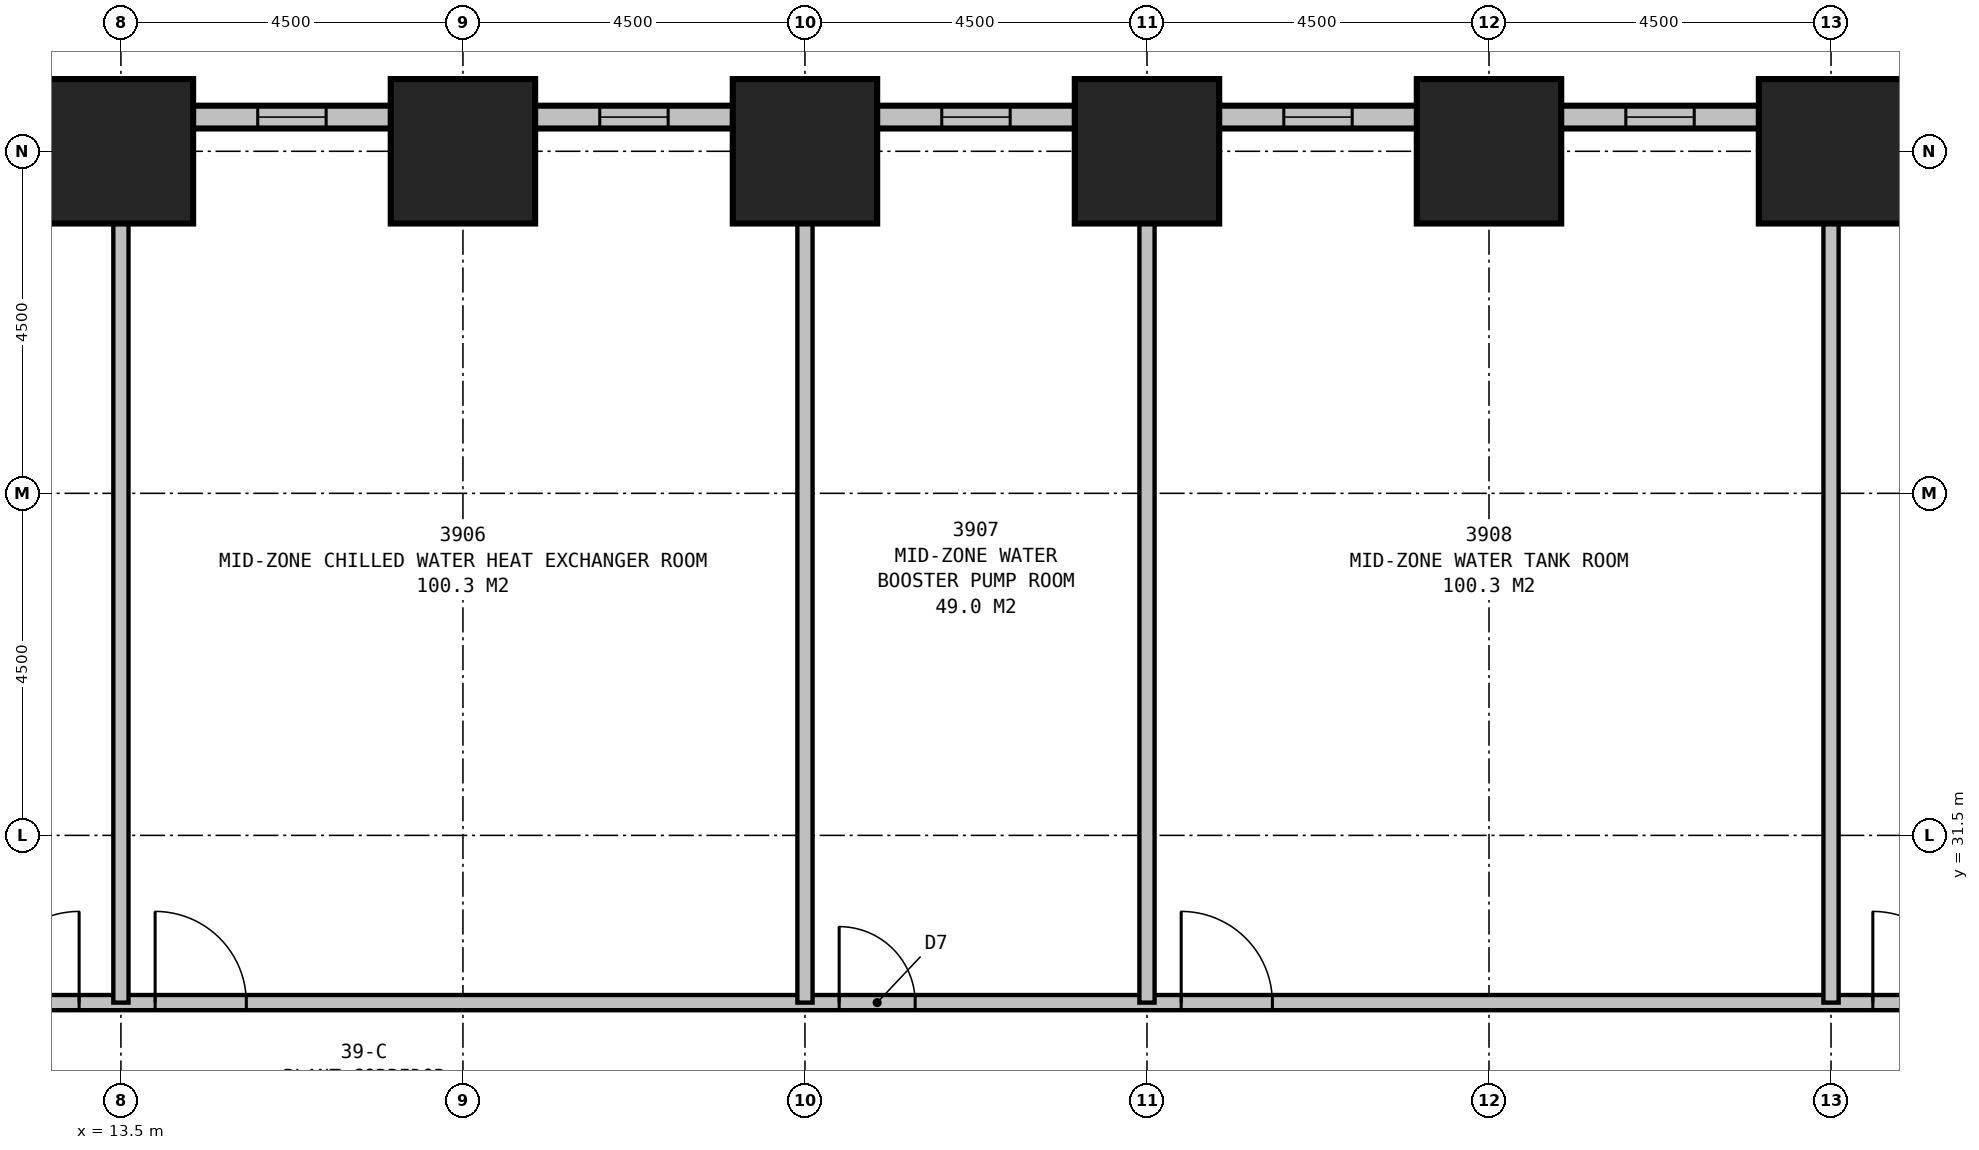
"""IFC4 building model, lengths in metres.
Left out: names, types, materials, properties, quantities, classifications, styles, units other than length and angle.
Written with IfcOpenShell. Run it as: python <this file> out.ifc"""

import sys

from ifc_helpers import new_model, si_unit, direction, frame, frame_2d, origin, origin_2d, place, context, subcontext, project, spatial, rectangle, extrude, element, fill, save


model = new_model("IFC4")
c1 = context("Model", 3, precision=1e-05, world=origin(), true_north=direction((0.0, 1.0)))
c2 = subcontext(c1, "Body", "Model", "MODEL_VIEW")
j1 = project(units=[si_unit("LENGTHUNIT", "METRE"), si_unit("PLANEANGLEUNIT", "RADIAN")], contexts=[c1])
p1 = place(None, origin())
s1 = spatial("IfcSite", under=j1, at=p1, CompositionType="ELEMENT")
p2 = place(p1, origin())
s2 = spatial("IfcBuilding", under=s1, at=p2, CompositionType="ELEMENT")
p3 = place(p2, frame((0.0, 0.0, 151.9)))
s3 = spatial("IfcBuildingStorey", under=s2, at=p3, CompositionType="ELEMENT", Elevation=151.9)
for number, where, z_axis, x_axis in (
    (1, (36.0, 40.5, 0.0), (0.0, 0.0, 1.0), (1.0, 0.0, 0.0)),
    (2, (31.5, 40.5, 0.0), (0.0, 0.0, 1.0), (1.0, 0.0, 0.0)),
    (3, (27.0, 40.5, 0.0), (0.0, 0.0, 1.0), (1.0, 0.0, 0.0)),
    (4, (22.5, 40.5, 0.0), (0.0, 0.0, 1.0), (1.0, 0.0, 0.0)),
    (5, (18.0, 40.5, 0.0), (0.0, 0.0, 1.0), (1.0, 0.0, 0.0)),
    (6, (13.5, 40.5, 0.0), (0.0, 0.0, 1.0), (1.0, 0.0, 0.0)),
):
    element("IfcColumn", number, at=place(p3, frame(where, z_axis=z_axis, x_axis=x_axis)), inside=s3, PredefinedType="COLUMN", context=c2, shape_type="SweptSolid", body=[
        extrude(rectangle(XDim=1.9, YDim=1.9, at=origin_2d()), origin(), (0.0, 0.0, 1.0), 6.0),
    ])
p4 = place(p3, frame((41.1, 40.95, 0.0), z_axis=(0.0, 0.0, 1.0), x_axis=(-1.0, 0.0, 0.0)))
e7 = element("IfcWall", 7, at=p4, inside=s3, PredefinedType="STANDARD", context=c2, shape_type="SweptSolid", body=[
    extrude(rectangle(XDim=32.7, YDim=0.3, at=frame_2d((16.35, 0.0))), origin(), (0.0, 0.0, 1.0), 3.35),
])
p5 = place(p4, frame((2.4, 0.0, 0.5)))
e8 = element("IfcOpeningElement", 8, at=p5, cuts=e7, PredefinedType="OPENING", context=c2, shape_type="SweptSolid", body=[
    extrude(rectangle(XDim=0.9, YDim=1.2, at=frame_2d((0.45, 0.6))), frame((0.0, 0.16, 0.0), z_axis=(0.0, -1.0, 0.0), x_axis=(1.0, 0.0, 0.0)), (0.0, 0.0, 1.0), 0.32),
])
p6 = place(p4, frame((6.9, 0.0, 0.5)))
e9 = element("IfcOpeningElement", 9, at=p6, cuts=e7, PredefinedType="OPENING", context=c2, shape_type="SweptSolid", body=[
    extrude(rectangle(XDim=0.9, YDim=1.2, at=frame_2d((0.45, 0.6))), frame((0.0, 0.16, 0.0), z_axis=(0.0, -1.0, 0.0), x_axis=(1.0, 0.0, 0.0)), (0.0, 0.0, 1.0), 0.32),
])
p7 = place(p4, frame((11.4, 0.0, 0.5)))
e10 = element("IfcOpeningElement", 10, at=p7, cuts=e7, PredefinedType="OPENING", context=c2, shape_type="SweptSolid", body=[
    extrude(rectangle(XDim=0.9, YDim=1.2, at=frame_2d((0.45, 0.6))), frame((0.0, 0.16, 0.0), z_axis=(0.0, -1.0, 0.0), x_axis=(1.0, 0.0, 0.0)), (0.0, 0.0, 1.0), 0.32),
])
p8 = place(p4, frame((15.9, 0.0, 0.5)))
e11 = element("IfcOpeningElement", 11, at=p8, cuts=e7, PredefinedType="OPENING", context=c2, shape_type="SweptSolid", body=[
    extrude(rectangle(XDim=0.9, YDim=1.2, at=frame_2d((0.45, 0.6))), frame((0.0, 0.16, 0.0), z_axis=(0.0, -1.0, 0.0), x_axis=(1.0, 0.0, 0.0)), (0.0, 0.0, 1.0), 0.32),
])
p9 = place(p4, frame((20.4, 0.0, 0.5)))
e12 = element("IfcOpeningElement", 12, at=p9, cuts=e7, PredefinedType="OPENING", context=c2, shape_type="SweptSolid", body=[
    extrude(rectangle(XDim=0.9, YDim=1.2, at=frame_2d((0.45, 0.6))), frame((0.0, 0.16, 0.0), z_axis=(0.0, -1.0, 0.0), x_axis=(1.0, 0.0, 0.0)), (0.0, 0.0, 1.0), 0.32),
])
p10 = place(p4, frame((24.9, 0.0, 0.5)))
e13 = element("IfcOpeningElement", 13, at=p10, cuts=e7, PredefinedType="OPENING", context=c2, shape_type="SweptSolid", body=[
    extrude(rectangle(XDim=0.9, YDim=1.2, at=frame_2d((0.45, 0.6))), frame((0.0, 0.16, 0.0), z_axis=(0.0, -1.0, 0.0), x_axis=(1.0, 0.0, 0.0)), (0.0, 0.0, 1.0), 0.32),
])
p11 = place(p4, frame((29.4, 0.0, 0.5)))
e14 = element("IfcOpeningElement", 14, at=p11, cuts=e7, PredefinedType="OPENING", context=c2, shape_type="SweptSolid", body=[
    extrude(rectangle(XDim=0.9, YDim=1.2, at=frame_2d((0.45, 0.6))), frame((0.0, 0.16, 0.0), z_axis=(0.0, -1.0, 0.0), x_axis=(1.0, 0.0, 0.0)), (0.0, 0.0, 1.0), 0.32),
])
p12 = place(p3, frame((11.2, 29.3, 0.0), z_axis=(0.0, 0.0, 1.0), x_axis=(1.0, 0.0, 0.0)))
e15 = element("IfcWall", 15, at=p12, inside=s3, PredefinedType="PARTITIONING", context=c2, shape_type="SweptSolid", body=[
    extrude(rectangle(XDim=27.1, YDim=0.2, at=frame_2d((13.55, 0.0))), origin(), (0.0, 0.0, 1.0), 5.75),
])
p13 = place(p12, frame((2.75, 0.0, 0.0)))
e16 = element("IfcOpeningElement", 16, at=p13, cuts=e15, PredefinedType="OPENING", context=c2, shape_type="SweptSolid", body=[
    extrude(rectangle(XDim=1.2, YDim=2.1, at=frame_2d((0.6, 1.05))), frame((0.0, 0.11, 0.0), z_axis=(0.0, -1.0, 0.0), x_axis=(1.0, 0.0, 0.0)), (0.0, 0.0, 1.0), 0.22),
])
p14 = place(p12, frame((11.75, 0.0, 0.0)))
e17 = element("IfcOpeningElement", 17, at=p14, cuts=e15, PredefinedType="OPENING", context=c2, shape_type="SweptSolid", body=[
    extrude(rectangle(XDim=1.0, YDim=2.1, at=frame_2d((0.5, 1.05))), frame((0.0, 0.11, 0.0), z_axis=(0.0, -1.0, 0.0), x_axis=(1.0, 0.0, 0.0)), (0.0, 0.0, 1.0), 0.22),
])
p15 = place(p12, frame((16.25, 0.0, 0.0)))
e18 = element("IfcOpeningElement", 18, at=p15, cuts=e15, PredefinedType="OPENING", context=c2, shape_type="SweptSolid", body=[
    extrude(rectangle(XDim=1.2, YDim=2.1, at=frame_2d((0.6, 1.05))), frame((0.0, 0.11, 0.0), z_axis=(0.0, -1.0, 0.0), x_axis=(1.0, 0.0, 0.0)), (0.0, 0.0, 1.0), 0.22),
])
p16 = place(p12, frame((0.55, 0.0, 0.0)))
e19 = element("IfcOpeningElement", 19, at=p16, cuts=e15, PredefinedType="OPENING", context=c2, shape_type="SweptSolid", body=[
    extrude(rectangle(XDim=1.2, YDim=2.1, at=frame_2d((0.6, 1.05))), frame((0.0, 0.11, 0.0), z_axis=(0.0, -1.0, 0.0), x_axis=(1.0, 0.0, 0.0)), (0.0, 0.0, 1.0), 0.22),
])
p17 = place(p12, frame((25.35, 0.0, 0.0)))
e20 = element("IfcOpeningElement", 20, at=p17, cuts=e15, PredefinedType="OPENING", context=c2, shape_type="SweptSolid", body=[
    extrude(rectangle(XDim=1.2, YDim=2.1, at=frame_2d((0.6, 1.05))), frame((0.0, 0.11, 0.0), z_axis=(0.0, -1.0, 0.0), x_axis=(1.0, 0.0, 0.0)), (0.0, 0.0, 1.0), 0.22),
])
for number, where, z_axis, x_axis in (
    (21, (13.5, 29.3, 0.0), (0.0, 0.0, 1.0), (0.0, 1.0, 0.0)),
    (22, (22.5, 29.3, 0.0), (0.0, 0.0, 1.0), (0.0, 1.0, 0.0)),
    (23, (27.0, 29.3, 0.0), (0.0, 0.0, 1.0), (0.0, 1.0, 0.0)),
    (24, (36.0, 29.3, 0.0), (0.0, 0.0, 1.0), (0.0, 1.0, 0.0)),
):
    element("IfcWall", number, at=place(p3, frame(where, z_axis=z_axis, x_axis=x_axis)), inside=s3, PredefinedType="PARTITIONING", context=c2, shape_type="SweptSolid", body=[
        extrude(rectangle(XDim=10.25, YDim=0.2, at=frame_2d((5.125, 0.0))), origin(), (0.0, 0.0, 1.0), 4.75),
    ])
p18 = place(p6, origin())
e25 = element("IfcWindow", 25, at=p18, inside=s3, PartitioningType="SINGLE_PANEL", PredefinedType="USERDEFINED", context=c2, shape_type="SweptSolid", body=[
    extrude(rectangle(XDim=0.9, YDim=1.2, at=frame_2d((0.45, 0.6))), frame((0.0, 0.03, 0.0), z_axis=(0.0, -1.0, 0.0), x_axis=(1.0, 0.0, 0.0)), (0.0, 0.0, 1.0), 0.06),
])
fill(e9, e25)
p19 = place(p7, origin())
e26 = element("IfcWindow", 26, at=p19, inside=s3, PartitioningType="SINGLE_PANEL", PredefinedType="USERDEFINED", context=c2, shape_type="SweptSolid", body=[
    extrude(rectangle(XDim=0.9, YDim=1.2, at=frame_2d((0.45, 0.6))), frame((0.0, 0.03, 0.0), z_axis=(0.0, -1.0, 0.0), x_axis=(1.0, 0.0, 0.0)), (0.0, 0.0, 1.0), 0.06),
])
fill(e10, e26)
p20 = place(p8, origin())
e27 = element("IfcWindow", 27, at=p20, inside=s3, PartitioningType="SINGLE_PANEL", PredefinedType="USERDEFINED", context=c2, shape_type="SweptSolid", body=[
    extrude(rectangle(XDim=0.9, YDim=1.2, at=frame_2d((0.45, 0.6))), frame((0.0, 0.03, 0.0), z_axis=(0.0, -1.0, 0.0), x_axis=(1.0, 0.0, 0.0)), (0.0, 0.0, 1.0), 0.06),
])
fill(e11, e27)
p21 = place(p9, origin())
e28 = element("IfcWindow", 28, at=p21, inside=s3, PartitioningType="SINGLE_PANEL", PredefinedType="USERDEFINED", context=c2, shape_type="SweptSolid", body=[
    extrude(rectangle(XDim=0.9, YDim=1.2, at=frame_2d((0.45, 0.6))), frame((0.0, 0.03, 0.0), z_axis=(0.0, -1.0, 0.0), x_axis=(1.0, 0.0, 0.0)), (0.0, 0.0, 1.0), 0.06),
])
fill(e12, e28)
p22 = place(p10, origin())
e29 = element("IfcWindow", 29, at=p22, inside=s3, PartitioningType="SINGLE_PANEL", PredefinedType="USERDEFINED", context=c2, shape_type="SweptSolid", body=[
    extrude(rectangle(XDim=0.9, YDim=1.2, at=frame_2d((0.45, 0.6))), frame((0.0, 0.03, 0.0), z_axis=(0.0, -1.0, 0.0), x_axis=(1.0, 0.0, 0.0)), (0.0, 0.0, 1.0), 0.06),
])
fill(e13, e29)
p23 = place(p13, origin())
e30 = element("IfcDoor", 30, at=p23, inside=s3, OperationType="SINGLE_SWING_LEFT", PredefinedType="DOOR", context=c2, shape_type="SweptSolid", body=[
    extrude(rectangle(XDim=1.2, YDim=2.1, at=frame_2d((0.6, 1.05))), frame((0.0, 0.025, 0.0), z_axis=(0.0, -1.0, 0.0), x_axis=(1.0, 0.0, 0.0)), (0.0, 0.0, 1.0), 0.05),
])
fill(e16, e30)
p24 = place(p14, origin())
e31 = element("IfcDoor", 31, at=p24, inside=s3, OperationType="SINGLE_SWING_LEFT", PredefinedType="DOOR", context=c2, shape_type="SweptSolid", body=[
    extrude(rectangle(XDim=1.0, YDim=2.1, at=frame_2d((0.5, 1.05))), frame((0.0, 0.025, 0.0), z_axis=(0.0, -1.0, 0.0), x_axis=(1.0, 0.0, 0.0)), (0.0, 0.0, 1.0), 0.05),
])
fill(e17, e31)
p25 = place(p15, origin())
e32 = element("IfcDoor", 32, at=p25, inside=s3, OperationType="SINGLE_SWING_LEFT", PredefinedType="DOOR", context=c2, shape_type="SweptSolid", body=[
    extrude(rectangle(XDim=1.2, YDim=2.1, at=frame_2d((0.6, 1.05))), frame((0.0, 0.025, 0.0), z_axis=(0.0, -1.0, 0.0), x_axis=(1.0, 0.0, 0.0)), (0.0, 0.0, 1.0), 0.05),
])
fill(e18, e32)
p26 = place(p16, origin())
e33 = element("IfcDoor", 33, at=p26, inside=s3, OperationType="SINGLE_SWING_RIGHT", PredefinedType="DOOR", context=c2, shape_type="SweptSolid", body=[
    extrude(rectangle(XDim=1.2, YDim=2.1, at=frame_2d((0.6, 1.05))), frame((0.0, 0.025, 0.0), z_axis=(0.0, -1.0, 0.0), x_axis=(1.0, 0.0, 0.0)), (0.0, 0.0, 1.0), 0.05),
])
fill(e19, e33)
p27 = place(p17, origin())
e34 = element("IfcDoor", 34, at=p27, inside=s3, OperationType="SINGLE_SWING_LEFT", PredefinedType="DOOR", context=c2, shape_type="SweptSolid", body=[
    extrude(rectangle(XDim=1.2, YDim=2.1, at=frame_2d((0.6, 1.05))), frame((0.0, 0.025, 0.0), z_axis=(0.0, -1.0, 0.0), x_axis=(1.0, 0.0, 0.0)), (0.0, 0.0, 1.0), 0.05),
])
fill(e20, e34)
save(model, sys.argv[1])
